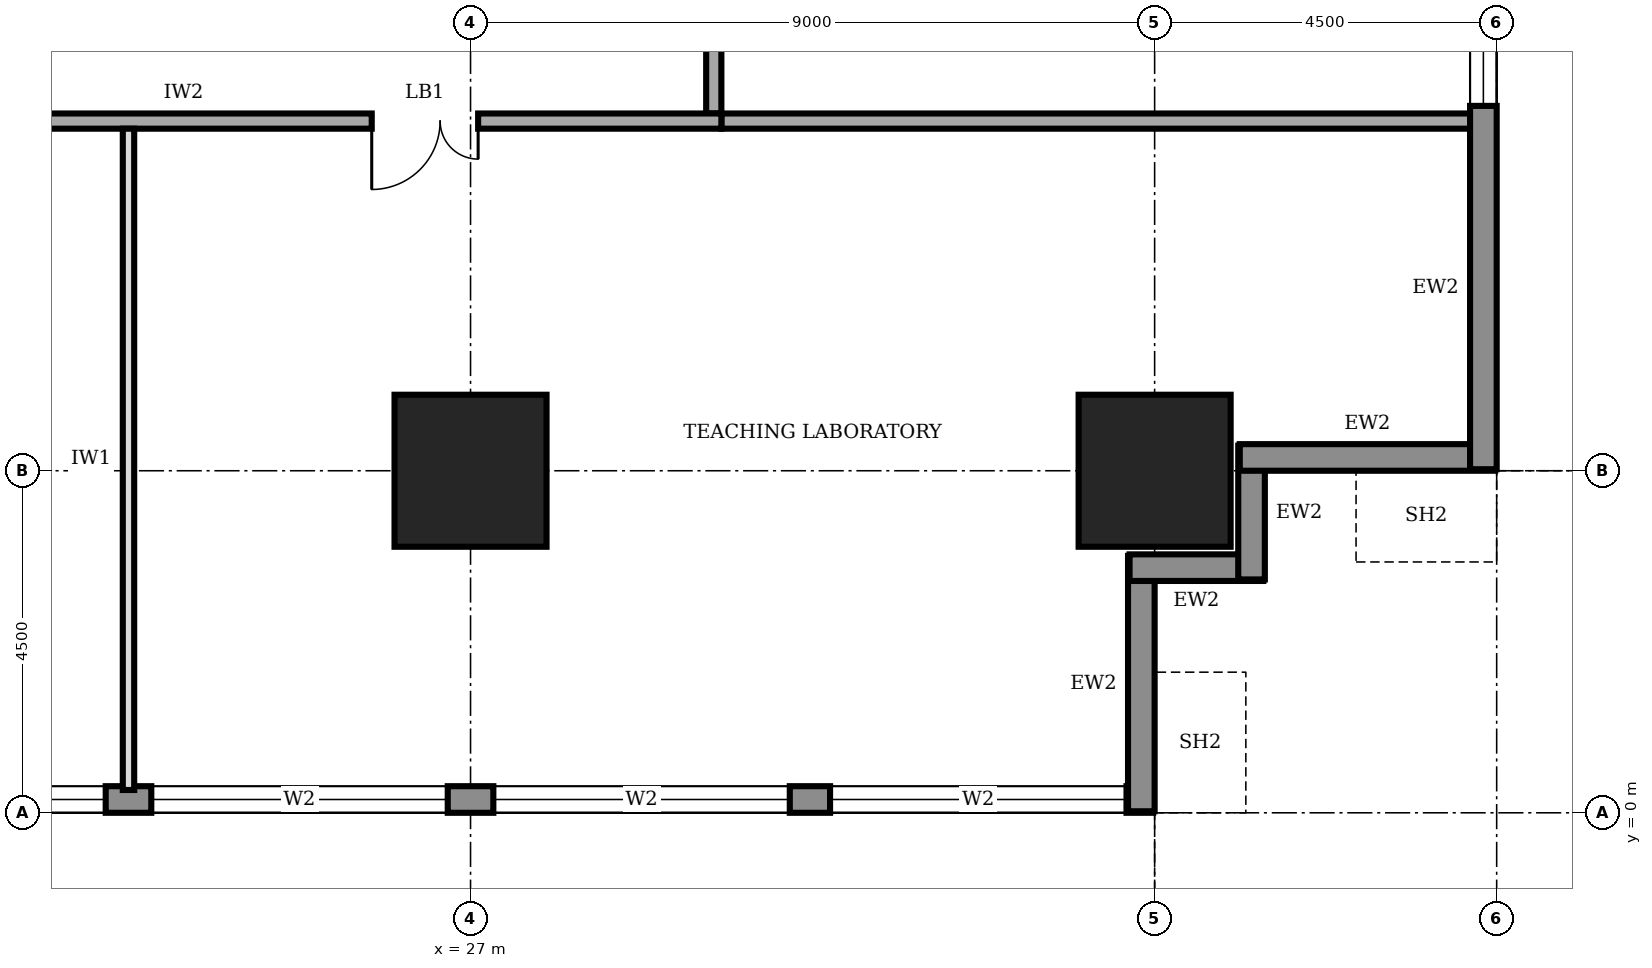
"""IFC4 building model, lengths in metres.
Left out: names, types, materials, properties, quantities, classifications, styles, units other than length and angle.
Written with IfcOpenShell. Run it as: python <this file> out.ifc"""

import sys

from ifc_helpers import new_model, si_unit, direction, frame, frame_2d, origin, origin_2d, place, context, subcontext, project, spatial, rectangle, extrude, element, fill, save


model = new_model("IFC4")
c1 = context("Model", 3, precision=1e-05, world=origin(), true_north=direction((0.0, 1.0)))
c2 = subcontext(c1, "Body", "Model", "MODEL_VIEW")
j1 = project(units=[si_unit("LENGTHUNIT", "METRE"), si_unit("PLANEANGLEUNIT", "RADIAN")], contexts=[c1])
p1 = place(None, origin())
s1 = spatial("IfcSite", under=j1, at=p1, CompositionType="ELEMENT")
p2 = place(p1, origin())
s2 = spatial("IfcBuilding", under=s1, at=p2, CompositionType="ELEMENT")
p3 = place(p2, frame((0.0, 0.0, 69.0)))
s3 = spatial("IfcBuildingStorey", under=s2, at=p3, CompositionType="ELEMENT", Elevation=69.0)
for number, where, z_axis, x_axis in (
    (1, (27.0, 4.5, 0.0), (0.0, 0.0, 1.0), (1.0, 0.0, 0.0)),
    (2, (36.0, 4.5, 0.0), (0.0, 0.0, 1.0), (1.0, 0.0, 0.0)),
):
    element("IfcColumn", number, at=place(p3, frame(where, z_axis=z_axis, x_axis=x_axis)), inside=s3, PredefinedType="COLUMN", context=c2, shape_type="SweptSolid", body=[
        extrude(rectangle(XDim=2.0, YDim=2.0, at=origin_2d()), origin(), (0.0, 0.0, 1.0), 4.0),
    ])
p4 = place(p3, frame((4.52, 0.175, 0.0), z_axis=(0.0, 0.0, 1.0), x_axis=(1.0, 0.0, 0.0)))
e3 = element("IfcWall", 3, at=p4, inside=s3, PredefinedType="STANDARD", context=c2, shape_type="SweptSolid", body=[
    extrude(rectangle(XDim=31.46, YDim=0.35, at=frame_2d((15.73, 0.0))), origin(), (0.0, 0.0, 1.0), 3.75),
])
p5 = place(p4, frame((4.78, 0.0, 0.6)))
e4 = element("IfcOpeningElement", 4, at=p5, cuts=e3, PredefinedType="OPENING", context=c2, shape_type="SweptSolid", body=[
    extrude(rectangle(XDim=3.9, YDim=2.6, at=frame_2d((1.95, 1.3))), frame((0.0, 0.185, 0.0), z_axis=(0.0, -1.0, 0.0), x_axis=(1.0, 0.0, 0.0)), (0.0, 0.0, 1.0), 0.37),
])
p6 = place(p4, frame((9.28, 0.0, 0.6)))
e5 = element("IfcOpeningElement", 5, at=p6, cuts=e3, PredefinedType="OPENING", context=c2, shape_type="SweptSolid", body=[
    extrude(rectangle(XDim=3.9, YDim=2.6, at=frame_2d((1.95, 1.3))), frame((0.0, 0.185, 0.0), z_axis=(0.0, -1.0, 0.0), x_axis=(1.0, 0.0, 0.0)), (0.0, 0.0, 1.0), 0.37),
])
p7 = place(p4, frame((13.78, 0.0, 0.6)))
e6 = element("IfcOpeningElement", 6, at=p7, cuts=e3, PredefinedType="OPENING", context=c2, shape_type="SweptSolid", body=[
    extrude(rectangle(XDim=3.9, YDim=2.6, at=frame_2d((1.95, 1.3))), frame((0.0, 0.185, 0.0), z_axis=(0.0, -1.0, 0.0), x_axis=(1.0, 0.0, 0.0)), (0.0, 0.0, 1.0), 0.37),
])
p8 = place(p4, frame((18.28, 0.0, 0.6)))
e7 = element("IfcOpeningElement", 7, at=p8, cuts=e3, PredefinedType="OPENING", context=c2, shape_type="SweptSolid", body=[
    extrude(rectangle(XDim=3.9, YDim=2.6, at=frame_2d((1.95, 1.3))), frame((0.0, 0.185, 0.0), z_axis=(0.0, -1.0, 0.0), x_axis=(1.0, 0.0, 0.0)), (0.0, 0.0, 1.0), 0.37),
])
p9 = place(p4, frame((22.78, 0.0, 0.6)))
e8 = element("IfcOpeningElement", 8, at=p9, cuts=e3, PredefinedType="OPENING", context=c2, shape_type="SweptSolid", body=[
    extrude(rectangle(XDim=3.9, YDim=2.6, at=frame_2d((1.95, 1.3))), frame((0.0, 0.185, 0.0), z_axis=(0.0, -1.0, 0.0), x_axis=(1.0, 0.0, 0.0)), (0.0, 0.0, 1.0), 0.37),
])
p10 = place(p4, frame((27.21, 0.0, 0.6)))
e9 = element("IfcOpeningElement", 9, at=p10, cuts=e3, PredefinedType="OPENING", context=c2, shape_type="SweptSolid", body=[
    extrude(rectangle(XDim=3.9, YDim=2.6, at=frame_2d((1.95, 1.3))), frame((0.0, 0.185, 0.0), z_axis=(0.0, -1.0, 0.0), x_axis=(1.0, 0.0, 0.0)), (0.0, 0.0, 1.0), 0.37),
])
p11 = place(p3, frame((35.825, 0.02, 0.0), z_axis=(0.0, 0.0, 1.0), x_axis=(0.0, 1.0, 0.0)))
e10 = element("IfcWall", 10, at=p11, inside=s3, PredefinedType="STANDARD", context=c2, shape_type="SweptSolid", body=[
    extrude(rectangle(XDim=3.36, YDim=0.35, at=frame_2d((1.68, 0.0))), origin(), (0.0, 0.0, 1.0), 2.85),
])
for number, where, z_axis, x_axis in (
    (11, (35.67, 3.225, 0.0), (0.0, 0.0, 1.0), (1.0, 0.0, 0.0)),
    (12, (37.275, 3.07, 0.0), (0.0, 0.0, 1.0), (0.0, 1.0, 0.0)),
):
    element("IfcWall", number, at=place(p3, frame(where, z_axis=z_axis, x_axis=x_axis)), inside=s3, PredefinedType="STANDARD", context=c2, shape_type="SweptSolid", body=[
        extrude(rectangle(XDim=1.76, YDim=0.35, at=frame_2d((0.88, 0.0))), origin(), (0.0, 0.0, 1.0), 3.75),
    ])
p12 = place(p3, frame((37.12, 4.675, 0.0), z_axis=(0.0, 0.0, 1.0), x_axis=(1.0, 0.0, 0.0)))
e13 = element("IfcWall", 13, at=p12, inside=s3, PredefinedType="STANDARD", context=c2, shape_type="SweptSolid", body=[
    extrude(rectangle(XDim=3.36, YDim=0.35, at=frame_2d((1.68, 0.0))), origin(), (0.0, 0.0, 1.0), 2.85),
])
p13 = place(p3, frame((40.325, 4.52, 0.0), z_axis=(0.0, 0.0, 1.0), x_axis=(0.0, 1.0, 0.0)))
e14 = element("IfcWall", 14, at=p13, inside=s3, PredefinedType="STANDARD", context=c2, shape_type="SweptSolid", body=[
    extrude(rectangle(XDim=31.46, YDim=0.35, at=frame_2d((15.73, 0.0))), origin(), (0.0, 0.0, 1.0), 3.75),
])
p14 = place(p13, frame((4.78, 0.0, 0.6)))
e15 = element("IfcOpeningElement", 15, at=p14, cuts=e14, PredefinedType="OPENING", context=c2, shape_type="SweptSolid", body=[
    extrude(rectangle(XDim=3.9, YDim=2.6, at=frame_2d((1.95, 1.3))), frame((0.0, 0.185, 0.0), z_axis=(0.0, -1.0, 0.0), x_axis=(1.0, 0.0, 0.0)), (0.0, 0.0, 1.0), 0.37),
])
p15 = place(p13, frame((9.28, 0.0, 0.6)))
e16 = element("IfcOpeningElement", 16, at=p15, cuts=e14, PredefinedType="OPENING", context=c2, shape_type="SweptSolid", body=[
    extrude(rectangle(XDim=3.9, YDim=2.6, at=frame_2d((1.95, 1.3))), frame((0.0, 0.185, 0.0), z_axis=(0.0, -1.0, 0.0), x_axis=(1.0, 0.0, 0.0)), (0.0, 0.0, 1.0), 0.37),
])
p16 = place(p13, frame((13.78, 0.0, 0.6)))
e17 = element("IfcOpeningElement", 17, at=p16, cuts=e14, PredefinedType="OPENING", context=c2, shape_type="SweptSolid", body=[
    extrude(rectangle(XDim=3.9, YDim=2.6, at=frame_2d((1.95, 1.3))), frame((0.0, 0.185, 0.0), z_axis=(0.0, -1.0, 0.0), x_axis=(1.0, 0.0, 0.0)), (0.0, 0.0, 1.0), 0.37),
])
p17 = place(p13, frame((18.28, 0.0, 0.6)))
e18 = element("IfcOpeningElement", 18, at=p17, cuts=e14, PredefinedType="OPENING", context=c2, shape_type="SweptSolid", body=[
    extrude(rectangle(XDim=3.9, YDim=2.6, at=frame_2d((1.95, 1.3))), frame((0.0, 0.185, 0.0), z_axis=(0.0, -1.0, 0.0), x_axis=(1.0, 0.0, 0.0)), (0.0, 0.0, 1.0), 0.37),
])
p18 = place(p13, frame((22.78, 0.0, 0.6)))
e19 = element("IfcOpeningElement", 19, at=p18, cuts=e14, PredefinedType="OPENING", context=c2, shape_type="SweptSolid", body=[
    extrude(rectangle(XDim=3.9, YDim=2.6, at=frame_2d((1.95, 1.3))), frame((0.0, 0.185, 0.0), z_axis=(0.0, -1.0, 0.0), x_axis=(1.0, 0.0, 0.0)), (0.0, 0.0, 1.0), 0.37),
])
p19 = place(p13, frame((27.21, 0.0, 0.6)))
e20 = element("IfcOpeningElement", 20, at=p19, cuts=e14, PredefinedType="OPENING", context=c2, shape_type="SweptSolid", body=[
    extrude(rectangle(XDim=3.9, YDim=2.6, at=frame_2d((1.95, 1.3))), frame((0.0, 0.185, 0.0), z_axis=(0.0, -1.0, 0.0), x_axis=(1.0, 0.0, 0.0)), (0.0, 0.0, 1.0), 0.37),
])
p20 = place(p3, frame((11.9, 9.1, 0.0), z_axis=(0.0, 0.0, 1.0), x_axis=(1.0, 0.0, 0.0)))
e21 = element("IfcWall", 21, at=p20, inside=s3, PredefinedType="SOLIDWALL", context=c2, shape_type="SweptSolid", body=[
    extrude(rectangle(XDim=18.4, YDim=0.2, at=frame_2d((9.2, 0.0))), origin(), (0.0, 0.0, 1.0), 3.75),
])
p21 = place(p20, frame((2.25, 0.0, 0.0)))
e22 = element("IfcOpeningElement", 22, at=p21, cuts=e21, PredefinedType="OPENING", context=c2, shape_type="SweptSolid", body=[
    extrude(rectangle(XDim=1.4, YDim=2.1, at=frame_2d((0.7, 1.05))), frame((0.0, 0.11, 0.0), z_axis=(0.0, -1.0, 0.0), x_axis=(1.0, 0.0, 0.0)), (0.0, 0.0, 1.0), 0.22),
])
p22 = place(p20, frame((7.85, 0.0, 0.0)))
e23 = element("IfcOpeningElement", 23, at=p22, cuts=e21, PredefinedType="OPENING", context=c2, shape_type="SweptSolid", body=[
    extrude(rectangle(XDim=1.0, YDim=2.1, at=frame_2d((0.5, 1.05))), frame((0.0, 0.11, 0.0), z_axis=(0.0, -1.0, 0.0), x_axis=(1.0, 0.0, 0.0)), (0.0, 0.0, 1.0), 0.22),
])
p23 = place(p20, frame((13.8, 0.0, 0.0)))
e24 = element("IfcOpeningElement", 24, at=p23, cuts=e21, PredefinedType="OPENING", context=c2, shape_type="SweptSolid", body=[
    extrude(rectangle(XDim=1.4, YDim=2.1, at=frame_2d((0.7, 1.05))), frame((0.0, 0.11, 0.0), z_axis=(0.0, -1.0, 0.0), x_axis=(1.0, 0.0, 0.0)), (0.0, 0.0, 1.0), 0.22),
])
p24 = place(p3, frame((30.2, 9.2, 0.0), z_axis=(0.0, 0.0, 1.0), x_axis=(0.0, 1.0, 0.0)))
e25 = element("IfcWall", 25, at=p24, inside=s3, PredefinedType="SOLIDWALL", context=c2, shape_type="SweptSolid", body=[
    extrude(rectangle(XDim=22.3, YDim=0.2, at=frame_2d((11.15, 0.0))), origin(), (0.0, 0.0, 1.0), 3.75),
])
p25 = place(p24, frame((5.85, 0.0, 0.0)))
e26 = element("IfcOpeningElement", 26, at=p25, cuts=e25, PredefinedType="OPENING", context=c2, shape_type="SweptSolid", body=[
    extrude(rectangle(XDim=1.4, YDim=2.1, at=frame_2d((0.7, 1.05))), frame((0.0, 0.11, 0.0), z_axis=(0.0, -1.0, 0.0), x_axis=(1.0, 0.0, 0.0)), (0.0, 0.0, 1.0), 0.22),
])
p26 = place(p24, frame((17.3, 0.0, 0.0)))
e27 = element("IfcOpeningElement", 27, at=p26, cuts=e25, PredefinedType="OPENING", context=c2, shape_type="SweptSolid", body=[
    extrude(rectangle(XDim=1.0, YDim=2.1, at=frame_2d((0.5, 1.05))), frame((0.0, 0.11, 0.0), z_axis=(0.0, -1.0, 0.0), x_axis=(1.0, 0.0, 0.0)), (0.0, 0.0, 1.0), 0.22),
])
p27 = place(p3, frame((30.3, 9.1, 0.0), z_axis=(0.0, 0.0, 1.0), x_axis=(1.0, 0.0, 0.0)))
e28 = element("IfcWall", 28, at=p27, inside=s3, PredefinedType="SOLIDWALL", context=c2, shape_type="SweptSolid", body=[
    extrude(rectangle(XDim=9.9, YDim=0.2, at=frame_2d((4.95, 0.0))), origin(), (0.0, 0.0, 1.0), 3.75),
])
p28 = place(p3, frame((22.5, 0.3, 0.0), z_axis=(0.0, 0.0, 1.0), x_axis=(0.0, 1.0, 0.0)))
e29 = element("IfcWall", 29, at=p28, inside=s3, PredefinedType="PARTITIONING", context=c2, shape_type="SweptSolid", body=[
    extrude(rectangle(XDim=8.7, YDim=0.15, at=frame_2d((4.35, 0.0))), origin(), (0.0, 0.0, 1.0), 3.75),
])
p29 = place(p7, origin())
e30 = element("IfcWindow", 30, at=p29, inside=s3, PartitioningType="SINGLE_PANEL", PredefinedType="WINDOW", context=c2, shape_type="SweptSolid", body=[
    extrude(rectangle(XDim=3.9, YDim=2.6, at=frame_2d((1.95, 1.3))), frame((0.0, 0.03, 0.0), z_axis=(0.0, -1.0, 0.0), x_axis=(1.0, 0.0, 0.0)), (0.0, 0.0, 1.0), 0.06),
])
fill(e6, e30)
p30 = place(p8, origin())
e31 = element("IfcWindow", 31, at=p30, inside=s3, PartitioningType="SINGLE_PANEL", PredefinedType="WINDOW", context=c2, shape_type="SweptSolid", body=[
    extrude(rectangle(XDim=3.9, YDim=2.6, at=frame_2d((1.95, 1.3))), frame((0.0, 0.03, 0.0), z_axis=(0.0, -1.0, 0.0), x_axis=(1.0, 0.0, 0.0)), (0.0, 0.0, 1.0), 0.06),
])
fill(e7, e31)
p31 = place(p9, origin())
e32 = element("IfcWindow", 32, at=p31, inside=s3, PartitioningType="SINGLE_PANEL", PredefinedType="WINDOW", context=c2, shape_type="SweptSolid", body=[
    extrude(rectangle(XDim=3.9, YDim=2.6, at=frame_2d((1.95, 1.3))), frame((0.0, 0.03, 0.0), z_axis=(0.0, -1.0, 0.0), x_axis=(1.0, 0.0, 0.0)), (0.0, 0.0, 1.0), 0.06),
])
fill(e8, e32)
p32 = place(p10, origin())
e33 = element("IfcWindow", 33, at=p32, inside=s3, PartitioningType="SINGLE_PANEL", PredefinedType="WINDOW", context=c2, shape_type="SweptSolid", body=[
    extrude(rectangle(XDim=3.9, YDim=2.6, at=frame_2d((1.95, 1.3))), frame((0.0, 0.03, 0.0), z_axis=(0.0, -1.0, 0.0), x_axis=(1.0, 0.0, 0.0)), (0.0, 0.0, 1.0), 0.06),
])
fill(e9, e33)
p33 = place(p14, origin())
e34 = element("IfcWindow", 34, at=p33, inside=s3, PartitioningType="SINGLE_PANEL", PredefinedType="WINDOW", context=c2, shape_type="SweptSolid", body=[
    extrude(rectangle(XDim=3.9, YDim=2.6, at=frame_2d((1.95, 1.3))), frame((0.0, 0.03, 0.0), z_axis=(0.0, -1.0, 0.0), x_axis=(1.0, 0.0, 0.0)), (0.0, 0.0, 1.0), 0.06),
])
fill(e15, e34)
p34 = place(p23, frame((1.4, 0.0, 0.0), z_axis=(0.0, 0.0, 1.0), x_axis=(-1.0, 0.0, 0.0)))
e35 = element("IfcDoor", 35, at=p34, inside=s3, OperationType="DOUBLE_DOOR_SINGLE_SWING", PredefinedType="DOOR", context=c2, shape_type="SweptSolid", body=[
    extrude(rectangle(XDim=1.4, YDim=2.1, at=frame_2d((0.7, 1.05))), frame((0.0, 0.025, 0.0), z_axis=(0.0, -1.0, 0.0), x_axis=(1.0, 0.0, 0.0)), (0.0, 0.0, 1.0), 0.05),
])
fill(e24, e35)
save(model, sys.argv[1])
